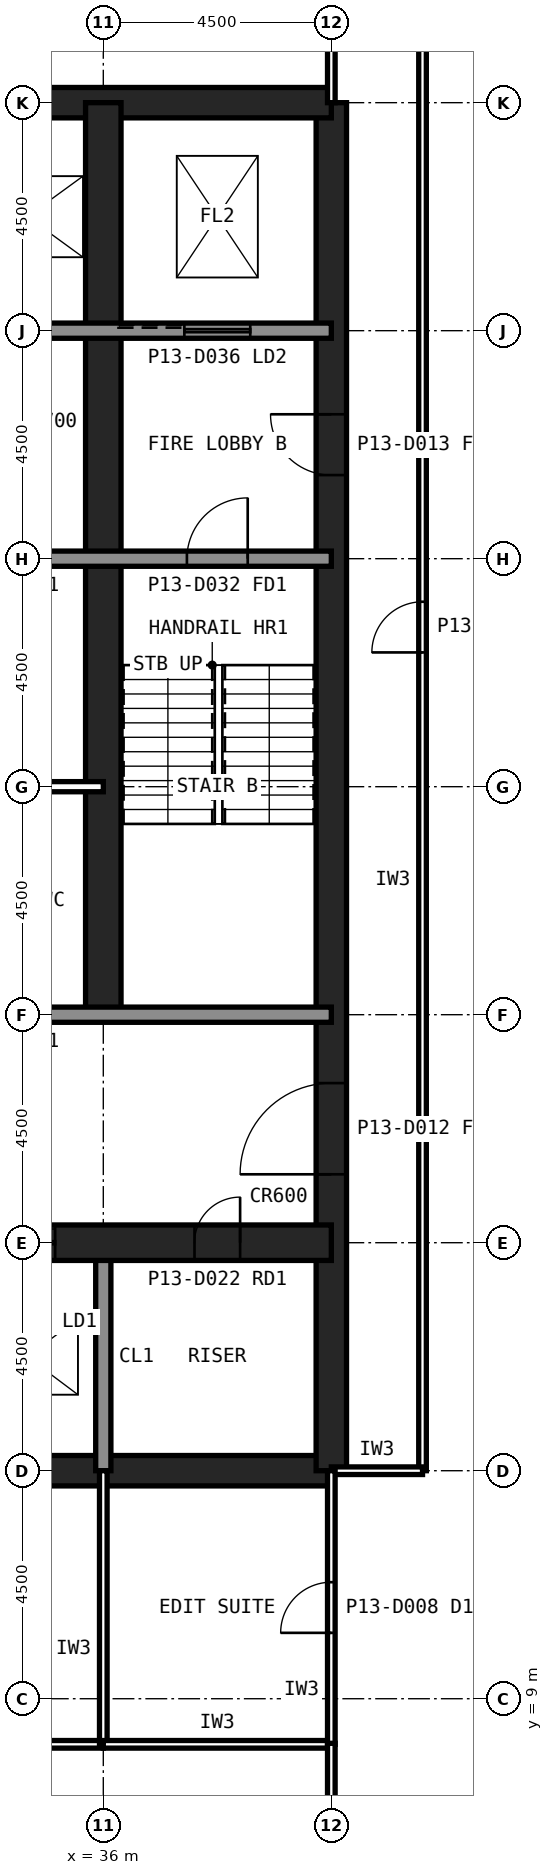
"""IFC4 building model, lengths in metres.
Left out: names, types, materials, properties, quantities, classifications, styles, units other than length and angle.
Written with IfcOpenShell. Run it as: python <this file> out.ifc"""

import sys

from ifc_helpers import new_model, si_unit, direction, frame, frame_2d, origin, place, context, subcontext, project, spatial, rectangle, extrude, element, fill, save


model = new_model("IFC4")
c1 = context("Model", 3, precision=1e-05, world=origin(), true_north=direction((0.0, 1.0)))
c2 = subcontext(c1, "Body", "Model", "MODEL_VIEW")
j1 = project(units=[si_unit("LENGTHUNIT", "METRE"), si_unit("PLANEANGLEUNIT", "RADIAN")], contexts=[c1])
p1 = place(None, origin())
s1 = spatial("IfcSite", under=j1, at=p1, CompositionType="ELEMENT")
p2 = place(p1, origin())
s2 = spatial("IfcBuilding", under=s1, at=p2, CompositionType="ELEMENT")
p3 = place(p2, frame((0.0, 0.0, 54.2)))
s3 = spatial("IfcBuildingStorey", under=s2, at=p3, CompositionType="ELEMENT", Elevation=54.2)
p4 = place(p3, frame((13.5, 13.5, 0.0), z_axis=(0.0, 0.0, 1.0), x_axis=(1.0, 0.0, 0.0)))
e1 = element("IfcWall", 1, at=p4, inside=s3, PredefinedType="SHEAR", context=c2, shape_type="SweptSolid", body=[
    extrude(rectangle(XDim=27.0, YDim=0.6, at=frame_2d((13.5, 0.0))), origin(), (0.0, 0.0, 1.0), 4.2),
])
p5 = place(p3, frame((40.5, 13.5, 0.0), z_axis=(0.0, 0.0, 1.0), x_axis=(0.0, 1.0, 0.0)))
e2 = element("IfcWall", 2, at=p5, inside=s3, PredefinedType="SHEAR", context=c2, shape_type="SweptSolid", body=[
    extrude(rectangle(XDim=27.0, YDim=0.6, at=frame_2d((13.5, 0.0))), origin(), (0.0, 0.0, 1.0), 4.2),
])
p6 = place(p5, frame((5.85, 0.0, 0.0)))
e3 = element("IfcOpeningElement", 3, at=p6, cuts=e2, PredefinedType="OPENING", context=c2, shape_type="SweptSolid", body=[
    extrude(rectangle(XDim=1.8, YDim=2.1, at=frame_2d((0.9, 1.05))), frame((0.0, 0.31, 0.0), z_axis=(0.0, -1.0, 0.0), x_axis=(1.0, 0.0, 0.0)), (0.0, 0.0, 1.0), 0.62),
])
p7 = place(p5, frame((19.65, 0.0, 0.0)))
e4 = element("IfcOpeningElement", 4, at=p7, cuts=e2, PredefinedType="OPENING", context=c2, shape_type="SweptSolid", body=[
    extrude(rectangle(XDim=1.2, YDim=2.1, at=frame_2d((0.6, 1.05))), frame((0.0, 0.31, 0.0), z_axis=(0.0, -1.0, 0.0), x_axis=(1.0, 0.0, 0.0)), (0.0, 0.0, 1.0), 0.62),
])
p8 = place(p3, frame((40.5, 40.5, 0.0), z_axis=(0.0, 0.0, 1.0), x_axis=(-1.0, 0.0, 0.0)))
e5 = element("IfcWall", 5, at=p8, inside=s3, PredefinedType="SHEAR", context=c2, shape_type="SweptSolid", body=[
    extrude(rectangle(XDim=27.0, YDim=0.6, at=frame_2d((13.5, 0.0))), origin(), (0.0, 0.0, 1.0), 4.2),
])
p9 = place(p3, frame((36.0, 13.5, 0.0), z_axis=(0.0, 0.0, 1.0), x_axis=(0.0, 1.0, 0.0)))
e6 = element("IfcWall", 6, at=p9, inside=s3, PredefinedType="SOLIDWALL", context=c2, shape_type="SweptSolid", body=[
    extrude(rectangle(XDim=4.5, YDim=0.3, at=frame_2d((2.25, 0.0))), origin(), (0.0, 0.0, 1.0), 4.04),
])
p10 = place(p3, frame((36.0, 22.5, 0.0), z_axis=(0.0, 0.0, 1.0), x_axis=(0.0, 1.0, 0.0)))
e7 = element("IfcWall", 7, at=p10, inside=s3, PredefinedType="SHEAR", context=c2, shape_type="SweptSolid", body=[
    extrude(rectangle(XDim=18.0, YDim=0.7, at=frame_2d((9.0, 0.0))), origin(), (0.0, 0.0, 1.0), 4.2),
])
p11 = place(p3, frame((13.5, 18.0, 0.0), z_axis=(0.0, 0.0, 1.0), x_axis=(1.0, 0.0, 0.0)))
e8 = element("IfcWall", 8, at=p11, inside=s3, PredefinedType="SHEAR", context=c2, shape_type="SweptSolid", body=[
    extrude(rectangle(XDim=27.0, YDim=0.7, at=frame_2d((13.5, 0.0))), origin(), (0.0, 0.0, 1.0), 4.2),
])
p12 = place(p11, frame((24.3, 0.0, 0.0)))
e9 = element("IfcOpeningElement", 9, at=p12, cuts=e8, PredefinedType="OPENING", context=c2, shape_type="SweptSolid", body=[
    extrude(rectangle(XDim=0.9, YDim=2.1, at=frame_2d((0.45, 1.05))), frame((0.0, 0.36, 0.0), z_axis=(0.0, -1.0, 0.0), x_axis=(1.0, 0.0, 0.0)), (0.0, 0.0, 1.0), 0.72),
])
p13 = place(p11, frame((5.45, 0.0, 0.0)))
e10 = element("IfcOpeningElement", 10, at=p13, cuts=e8, PredefinedType="OPENING", context=c2, shape_type="SweptSolid", body=[
    extrude(rectangle(XDim=1.1, YDim=2.1, at=frame_2d((0.55, 1.05))), frame((0.0, 0.36, 0.0), z_axis=(0.0, -1.0, 0.0), x_axis=(1.0, 0.0, 0.0)), (0.0, 0.0, 1.0), 0.72),
])
p14 = place(p11, frame((8.45, 0.0, 0.0)))
e11 = element("IfcOpeningElement", 11, at=p14, cuts=e8, PredefinedType="OPENING", context=c2, shape_type="SweptSolid", body=[
    extrude(rectangle(XDim=1.1, YDim=2.1, at=frame_2d((0.55, 1.05))), frame((0.0, 0.36, 0.0), z_axis=(0.0, -1.0, 0.0), x_axis=(1.0, 0.0, 0.0)), (0.0, 0.0, 1.0), 0.72),
])
p15 = place(p11, frame((11.45, 0.0, 0.0)))
e12 = element("IfcOpeningElement", 12, at=p15, cuts=e8, PredefinedType="OPENING", context=c2, shape_type="SweptSolid", body=[
    extrude(rectangle(XDim=1.1, YDim=2.1, at=frame_2d((0.55, 1.05))), frame((0.0, 0.36, 0.0), z_axis=(0.0, -1.0, 0.0), x_axis=(1.0, 0.0, 0.0)), (0.0, 0.0, 1.0), 0.72),
])
p16 = place(p11, frame((14.45, 0.0, 0.0)))
e13 = element("IfcOpeningElement", 13, at=p16, cuts=e8, PredefinedType="OPENING", context=c2, shape_type="SweptSolid", body=[
    extrude(rectangle(XDim=1.1, YDim=2.1, at=frame_2d((0.55, 1.05))), frame((0.0, 0.36, 0.0), z_axis=(0.0, -1.0, 0.0), x_axis=(1.0, 0.0, 0.0)), (0.0, 0.0, 1.0), 0.72),
])
p17 = place(p11, frame((17.45, 0.0, 0.0)))
e14 = element("IfcOpeningElement", 14, at=p17, cuts=e8, PredefinedType="OPENING", context=c2, shape_type="SweptSolid", body=[
    extrude(rectangle(XDim=1.1, YDim=2.1, at=frame_2d((0.55, 1.05))), frame((0.0, 0.36, 0.0), z_axis=(0.0, -1.0, 0.0), x_axis=(1.0, 0.0, 0.0)), (0.0, 0.0, 1.0), 0.72),
])
p18 = place(p11, frame((20.45, 0.0, 0.0)))
e15 = element("IfcOpeningElement", 15, at=p18, cuts=e8, PredefinedType="OPENING", context=c2, shape_type="SweptSolid", body=[
    extrude(rectangle(XDim=1.1, YDim=2.1, at=frame_2d((0.55, 1.05))), frame((0.0, 0.36, 0.0), z_axis=(0.0, -1.0, 0.0), x_axis=(1.0, 0.0, 0.0)), (0.0, 0.0, 1.0), 0.72),
])
p19 = place(p11, frame((1.6, 0.0, 0.0)))
e16 = element("IfcOpeningElement", 16, at=p19, cuts=e8, PredefinedType="OPENING", context=c2, shape_type="SweptSolid", body=[
    extrude(rectangle(XDim=1.3, YDim=2.2, at=frame_2d((0.65, 1.1))), frame((0.0, 0.36, 0.0), z_axis=(0.0, -1.0, 0.0), x_axis=(1.0, 0.0, 0.0)), (0.0, 0.0, 1.0), 0.72),
])
p20 = place(p3, frame((13.5, 36.0, 0.0), z_axis=(0.0, 0.0, 1.0), x_axis=(1.0, 0.0, 0.0)))
e17 = element("IfcWall", 17, at=p20, inside=s3, PredefinedType="SOLIDWALL", context=c2, shape_type="SweptSolid", body=[
    extrude(rectangle(XDim=27.0, YDim=0.3, at=frame_2d((13.5, 0.0))), origin(), (0.0, 0.0, 1.0), 4.04),
])
p21 = place(p20, frame((1.8, 0.0, 0.0)))
e18 = element("IfcOpeningElement", 18, at=p21, cuts=e17, PredefinedType="OPENING", context=c2, shape_type="SweptSolid", body=[
    extrude(rectangle(XDim=0.9, YDim=2.1, at=frame_2d((0.45, 1.05))), frame((0.0, 0.16, 0.0), z_axis=(0.0, -1.0, 0.0), x_axis=(1.0, 0.0, 0.0)), (0.0, 0.0, 1.0), 0.32),
])
p22 = place(p20, frame((24.1, 0.0, 0.0)))
e19 = element("IfcOpeningElement", 19, at=p22, cuts=e17, PredefinedType="OPENING", context=c2, shape_type="SweptSolid", body=[
    extrude(rectangle(XDim=1.3, YDim=2.2, at=frame_2d((0.65, 1.1))), frame((0.0, 0.16, 0.0), z_axis=(0.0, -1.0, 0.0), x_axis=(1.0, 0.0, 0.0)), (0.0, 0.0, 1.0), 0.32),
])
p23 = place(p3, frame((13.5, 22.5, 0.0), z_axis=(0.0, 0.0, 1.0), x_axis=(1.0, 0.0, 0.0)))
e20 = element("IfcWall", 20, at=p23, inside=s3, PredefinedType="SOLIDWALL", context=c2, shape_type="SweptSolid", body=[
    extrude(rectangle(XDim=27.0, YDim=0.3, at=frame_2d((13.5, 0.0))), origin(), (0.0, 0.0, 1.0), 4.04),
])
p24 = place(p23, frame((1.65, 0.0, 0.0)))
e21 = element("IfcOpeningElement", 21, at=p24, cuts=e20, PredefinedType="OPENING", context=c2, shape_type="SweptSolid", body=[
    extrude(rectangle(XDim=1.2, YDim=2.1, at=frame_2d((0.6, 1.05))), frame((0.0, 0.16, 0.0), z_axis=(0.0, -1.0, 0.0), x_axis=(1.0, 0.0, 0.0)), (0.0, 0.0, 1.0), 0.32),
])
p25 = place(p23, frame((6.025, 0.0, 0.0)))
e22 = element("IfcOpeningElement", 22, at=p25, cuts=e20, PredefinedType="OPENING", context=c2, shape_type="SweptSolid", body=[
    extrude(rectangle(XDim=1.0, YDim=2.1, at=frame_2d((0.5, 1.05))), frame((0.0, 0.16, 0.0), z_axis=(0.0, -1.0, 0.0), x_axis=(1.0, 0.0, 0.0)), (0.0, 0.0, 1.0), 0.32),
])
p26 = place(p23, frame((10.525, 0.0, 0.0)))
e23 = element("IfcOpeningElement", 23, at=p26, cuts=e20, PredefinedType="OPENING", context=c2, shape_type="SweptSolid", body=[
    extrude(rectangle(XDim=1.0, YDim=2.1, at=frame_2d((0.5, 1.05))), frame((0.0, 0.16, 0.0), z_axis=(0.0, -1.0, 0.0), x_axis=(1.0, 0.0, 0.0)), (0.0, 0.0, 1.0), 0.32),
])
p27 = place(p23, frame((19.75, 0.0, 0.0)))
e24 = element("IfcOpeningElement", 24, at=p27, cuts=e20, PredefinedType="OPENING", context=c2, shape_type="SweptSolid", body=[
    extrude(rectangle(XDim=1.0, YDim=2.1, at=frame_2d((0.5, 1.05))), frame((0.0, 0.16, 0.0), z_axis=(0.0, -1.0, 0.0), x_axis=(1.0, 0.0, 0.0)), (0.0, 0.0, 1.0), 0.32),
])
p28 = place(p23, frame((15.05, 0.0, 0.0)))
e25 = element("IfcOpeningElement", 25, at=p28, cuts=e20, PredefinedType="OPENING", context=c2, shape_type="SweptSolid", body=[
    extrude(rectangle(XDim=1.4, YDim=2.4, at=frame_2d((0.7, 1.2))), frame((0.0, 0.16, 0.0), z_axis=(0.0, -1.0, 0.0), x_axis=(1.0, 0.0, 0.0)), (0.0, 0.0, 1.0), 0.32),
])
p29 = place(p3, frame((13.5, 31.5, 0.0), z_axis=(0.0, 0.0, 1.0), x_axis=(1.0, 0.0, 0.0)))
e26 = element("IfcWall", 26, at=p29, inside=s3, PredefinedType="SOLIDWALL", context=c2, shape_type="SweptSolid", body=[
    extrude(rectangle(XDim=27.0, YDim=0.3, at=frame_2d((13.5, 0.0))), origin(), (0.0, 0.0, 1.0), 4.04),
])
p30 = place(p29, frame((24.15, 0.0, 0.0)))
e27 = element("IfcOpeningElement", 27, at=p30, cuts=e26, PredefinedType="OPENING", context=c2, shape_type="SweptSolid", body=[
    extrude(rectangle(XDim=1.2, YDim=2.1, at=frame_2d((0.6, 1.05))), frame((0.0, 0.16, 0.0), z_axis=(0.0, -1.0, 0.0), x_axis=(1.0, 0.0, 0.0)), (0.0, 0.0, 1.0), 0.32),
])
p31 = place(p29, frame((15.3, 0.0, 0.0)))
e28 = element("IfcOpeningElement", 28, at=p31, cuts=e26, PredefinedType="OPENING", context=c2, shape_type="SweptSolid", body=[
    extrude(rectangle(XDim=0.9, YDim=2.1, at=frame_2d((0.45, 1.05))), frame((0.0, 0.16, 0.0), z_axis=(0.0, -1.0, 0.0), x_axis=(1.0, 0.0, 0.0)), (0.0, 0.0, 1.0), 0.32),
])
p32 = place(p29, frame((19.8, 0.0, 0.0)))
e29 = element("IfcOpeningElement", 29, at=p32, cuts=e26, PredefinedType="OPENING", context=c2, shape_type="SweptSolid", body=[
    extrude(rectangle(XDim=0.9, YDim=2.1, at=frame_2d((0.45, 1.05))), frame((0.0, 0.16, 0.0), z_axis=(0.0, -1.0, 0.0), x_axis=(1.0, 0.0, 0.0)), (0.0, 0.0, 1.0), 0.32),
])
p33 = place(p3, frame((27.0, 27.0, 0.0), z_axis=(0.0, 0.0, 1.0), x_axis=(1.0, 0.0, 0.0)))
e30 = element("IfcWall", 30, at=p33, inside=s3, PredefinedType="PARTITIONING", context=c2, shape_type="SweptSolid", body=[
    extrude(rectangle(XDim=9.0, YDim=0.2, at=frame_2d((4.5, 0.0))), origin(), (0.0, 0.0, 1.0), 4.04),
])
p34 = place(p3, frame((18.0, 33.3, 0.0), z_axis=(0.0, 0.0, 1.0), x_axis=(1.0, 0.0, 0.0)))
e31 = element("IfcWall", 31, at=p34, inside=s3, PredefinedType="PARTITIONING", context=c2, shape_type="SweptSolid", body=[
    extrude(rectangle(XDim=18.0, YDim=0.15, at=frame_2d((9.0, 0.0))), origin(), (0.0, 0.0, 1.0), 4.04),
])
p35 = place(p34, frame((5.55, 0.0, 0.0)))
e32 = element("IfcOpeningElement", 32, at=p35, cuts=e31, PredefinedType="OPENING", context=c2, shape_type="SweptSolid", body=[
    extrude(rectangle(XDim=0.9, YDim=2.1, at=frame_2d((0.45, 1.05))), frame((0.0, 0.085, 0.0), z_axis=(0.0, -1.0, 0.0), x_axis=(1.0, 0.0, 0.0)), (0.0, 0.0, 1.0), 0.17),
])
p36 = place(p34, frame((14.55, 0.0, 0.0)))
e33 = element("IfcOpeningElement", 33, at=p36, cuts=e31, PredefinedType="OPENING", context=c2, shape_type="SweptSolid", body=[
    extrude(rectangle(XDim=0.9, YDim=2.1, at=frame_2d((0.45, 1.05))), frame((0.0, 0.085, 0.0), z_axis=(0.0, -1.0, 0.0), x_axis=(1.0, 0.0, 0.0)), (0.0, 0.0, 1.0), 0.17),
])
p37 = place(p3, frame((42.3, 13.5, 0.0), z_axis=(0.0, 0.0, 1.0), x_axis=(0.0, 1.0, 0.0)))
e34 = element("IfcWall", 34, at=p37, inside=s3, PredefinedType="PARTITIONING", context=c2, shape_type="SweptSolid", body=[
    extrude(rectangle(XDim=27.0, YDim=0.15, at=frame_2d((13.5, 0.0))), origin(), (0.0, 0.0, 1.0), 4.04),
])
p38 = place(p37, frame((13.0, 0.0, 0.0)))
e35 = element("IfcOpeningElement", 35, at=p38, cuts=e34, PredefinedType="OPENING", context=c2, shape_type="SweptSolid", body=[
    extrude(rectangle(XDim=1.0, YDim=2.1, at=frame_2d((0.5, 1.05))), frame((0.0, 0.085, 0.0), z_axis=(0.0, -1.0, 0.0), x_axis=(1.0, 0.0, 0.0)), (0.0, 0.0, 1.0), 0.17),
])
for number, where, z_axis, x_axis in (
    (36, (40.5, 13.5, 0.0), (0.0, 0.0, 1.0), (1.0, 0.0, 0.0)),
    (37, (42.3, 40.5, 0.0), (0.0, 0.0, 1.0), (-1.0, 0.0, 0.0)),
):
    element("IfcWall", number, at=place(p3, frame(where, z_axis=z_axis, x_axis=x_axis)), inside=s3, PredefinedType="PARTITIONING", context=c2, shape_type="SweptSolid", body=[
        extrude(rectangle(XDim=1.8, YDim=0.15, at=frame_2d((0.9, 0.0))), origin(), (0.0, 0.0, 1.0), 3.189),
    ])
p39 = place(p3, frame((31.5, 8.1, 0.0), z_axis=(0.0, 0.0, 1.0), x_axis=(1.0, 0.0, 0.0)))
e38 = element("IfcWall", 38, at=p39, inside=s3, PredefinedType="PARTITIONING", context=c2, shape_type="SweptSolid", body=[
    extrude(rectangle(XDim=4.5, YDim=0.15, at=frame_2d((2.25, 0.0))), origin(), (0.0, 0.0, 1.0), 4.04),
])
p40 = place(p39, frame((1.75, 0.0, 0.0)))
e39 = element("IfcOpeningElement", 39, at=p40, cuts=e38, PredefinedType="OPENING", context=c2, shape_type="SweptSolid", body=[
    extrude(rectangle(XDim=1.0, YDim=2.1, at=frame_2d((0.5, 1.05))), frame((0.0, 0.085, 0.0), z_axis=(0.0, -1.0, 0.0), x_axis=(1.0, 0.0, 0.0)), (0.0, 0.0, 1.0), 0.17),
])
p41 = place(p3, frame((36.0, 8.1, 0.0), z_axis=(0.0, 0.0, 1.0), x_axis=(0.0, 1.0, 0.0)))
e40 = element("IfcWall", 40, at=p41, inside=s3, PredefinedType="PARTITIONING", context=c2, shape_type="SweptSolid", body=[
    extrude(rectangle(XDim=5.4, YDim=0.15, at=frame_2d((2.7, 0.0))), origin(), (0.0, 0.0, 1.0), 3.189),
])
p42 = place(p3, frame((36.0, 8.1, 0.0), z_axis=(0.0, 0.0, 1.0), x_axis=(1.0, 0.0, 0.0)))
e41 = element("IfcWall", 41, at=p42, inside=s3, PredefinedType="PARTITIONING", context=c2, shape_type="SweptSolid", body=[
    extrude(rectangle(XDim=4.5, YDim=0.15, at=frame_2d((2.25, 0.0))), origin(), (0.0, 0.0, 1.0), 4.04),
])
p43 = place(p3, frame((40.5, 8.1, 0.0), z_axis=(0.0, 0.0, 1.0), x_axis=(0.0, 1.0, 0.0)))
e42 = element("IfcWall", 42, at=p43, inside=s3, PredefinedType="PARTITIONING", context=c2, shape_type="SweptSolid", body=[
    extrude(rectangle(XDim=5.4, YDim=0.15, at=frame_2d((2.7, 0.0))), origin(), (0.0, 0.0, 1.0), 3.189),
])
p44 = place(p43, frame((2.2, 0.0, 0.0)))
e43 = element("IfcOpeningElement", 43, at=p44, cuts=e42, PredefinedType="OPENING", context=c2, shape_type="SweptSolid", body=[
    extrude(rectangle(XDim=1.0, YDim=2.1, at=frame_2d((0.5, 1.05))), frame((0.0, 0.085, 0.0), z_axis=(0.0, -1.0, 0.0), x_axis=(1.0, 0.0, 0.0)), (0.0, 0.0, 1.0), 0.17),
])
p45 = place(p3, frame((40.5, 40.5, 0.0), z_axis=(0.0, 0.0, 1.0), x_axis=(0.0, 1.0, 0.0)))
e44 = element("IfcWall", 44, at=p45, inside=s3, PredefinedType="PARTITIONING", context=c2, shape_type="SweptSolid", body=[
    extrude(rectangle(XDim=4.5, YDim=0.15, at=frame_2d((2.25, 0.0))), origin(), (0.0, 0.0, 1.0), 3.189),
])
p46 = place(p3, frame((40.5, 0.445, 0.0), z_axis=(0.0, 0.0, 1.0), x_axis=(0.0, 1.0, 0.0)))
e45 = element("IfcWall", 45, at=p46, inside=s3, PredefinedType="PARTITIONING", context=c2, shape_type="SweptSolid", body=[
    extrude(rectangle(XDim=7.675, YDim=0.15, at=frame_2d((3.837, 0.0))), origin(), (0.0, 0.0, 1.0), 3.189),
])
p47 = place(p46, frame((3.337, 0.0, 0.0)))
e46 = element("IfcOpeningElement", 46, at=p47, cuts=e45, PredefinedType="OPENING", context=c2, shape_type="SweptSolid", body=[
    extrude(rectangle(XDim=1.0, YDim=2.1, at=frame_2d((0.5, 1.05))), frame((0.0, 0.085, 0.0), z_axis=(0.0, -1.0, 0.0), x_axis=(1.0, 0.0, 0.0)), (0.0, 0.0, 1.0), 0.17),
])
p48 = place(p6, origin())
e47 = element("IfcDoor", 47, at=p48, inside=s3, OperationType="SINGLE_SWING_LEFT", PredefinedType="DOOR", context=c2, shape_type="SweptSolid", body=[
    extrude(rectangle(XDim=1.8, YDim=2.1, at=frame_2d((0.9, 1.05))), frame((0.0, 0.025, 0.0), z_axis=(0.0, -1.0, 0.0), x_axis=(1.0, 0.0, 0.0)), (0.0, 0.0, 1.0), 0.05),
])
fill(e3, e47)
p49 = place(p7, origin())
e48 = element("IfcDoor", 48, at=p49, inside=s3, OperationType="SINGLE_SWING_RIGHT", PredefinedType="DOOR", context=c2, shape_type="SweptSolid", body=[
    extrude(rectangle(XDim=1.2, YDim=2.1, at=frame_2d((0.6, 1.05))), frame((0.0, 0.025, 0.0), z_axis=(0.0, -1.0, 0.0), x_axis=(1.0, 0.0, 0.0)), (0.0, 0.0, 1.0), 0.05),
])
fill(e4, e48)
p50 = place(p30, origin())
e49 = element("IfcDoor", 49, at=p50, inside=s3, OperationType="SINGLE_SWING_RIGHT", PredefinedType="DOOR", context=c2, shape_type="SweptSolid", body=[
    extrude(rectangle(XDim=1.2, YDim=2.1, at=frame_2d((0.6, 1.05))), frame((0.0, 0.025, 0.0), z_axis=(0.0, -1.0, 0.0), x_axis=(1.0, 0.0, 0.0)), (0.0, 0.0, 1.0), 0.05),
])
fill(e27, e49)
p51 = place(p12, origin())
e50 = element("IfcDoor", 50, at=p51, inside=s3, OperationType="SINGLE_SWING_RIGHT", PredefinedType="DOOR", context=c2, shape_type="SweptSolid", body=[
    extrude(rectangle(XDim=0.9, YDim=2.1, at=frame_2d((0.45, 1.05))), frame((0.0, 0.025, 0.0), z_axis=(0.0, -1.0, 0.0), x_axis=(1.0, 0.0, 0.0)), (0.0, 0.0, 1.0), 0.05),
])
fill(e9, e50)
p52 = place(p18, origin())
e51 = element("IfcDoor", 51, at=p52, inside=s3, OperationType="SLIDING_TO_LEFT", PredefinedType="DOOR", context=c2, shape_type="SweptSolid", body=[
    extrude(rectangle(XDim=1.1, YDim=2.1, at=frame_2d((0.55, 1.05))), frame((0.0, 0.025, 0.0), z_axis=(0.0, -1.0, 0.0), x_axis=(1.0, 0.0, 0.0)), (0.0, 0.0, 1.0), 0.05),
])
fill(e15, e51)
p53 = place(p22, origin())
e52 = element("IfcDoor", 52, at=p53, inside=s3, OperationType="SLIDING_TO_LEFT", PredefinedType="DOOR", context=c2, shape_type="SweptSolid", body=[
    extrude(rectangle(XDim=1.3, YDim=2.2, at=frame_2d((0.65, 1.1))), frame((0.0, 0.025, 0.0), z_axis=(0.0, -1.0, 0.0), x_axis=(1.0, 0.0, 0.0)), (0.0, 0.0, 1.0), 0.05),
])
fill(e19, e52)
p54 = place(p38, origin())
e53 = element("IfcDoor", 53, at=p54, inside=s3, OperationType="SINGLE_SWING_LEFT", PredefinedType="DOOR", context=c2, shape_type="SweptSolid", body=[
    extrude(rectangle(XDim=1.0, YDim=2.1, at=frame_2d((0.5, 1.05))), frame((0.0, 0.025, 0.0), z_axis=(0.0, -1.0, 0.0), x_axis=(1.0, 0.0, 0.0)), (0.0, 0.0, 1.0), 0.05),
])
fill(e35, e53)
p55 = place(p44, origin())
e54 = element("IfcDoor", 54, at=p55, inside=s3, OperationType="SINGLE_SWING_LEFT", PredefinedType="DOOR", context=c2, shape_type="SweptSolid", body=[
    extrude(rectangle(XDim=1.0, YDim=2.1, at=frame_2d((0.5, 1.05))), frame((0.0, 0.025, 0.0), z_axis=(0.0, -1.0, 0.0), x_axis=(1.0, 0.0, 0.0)), (0.0, 0.0, 1.0), 0.05),
])
fill(e43, e54)
save(model, sys.argv[1])
